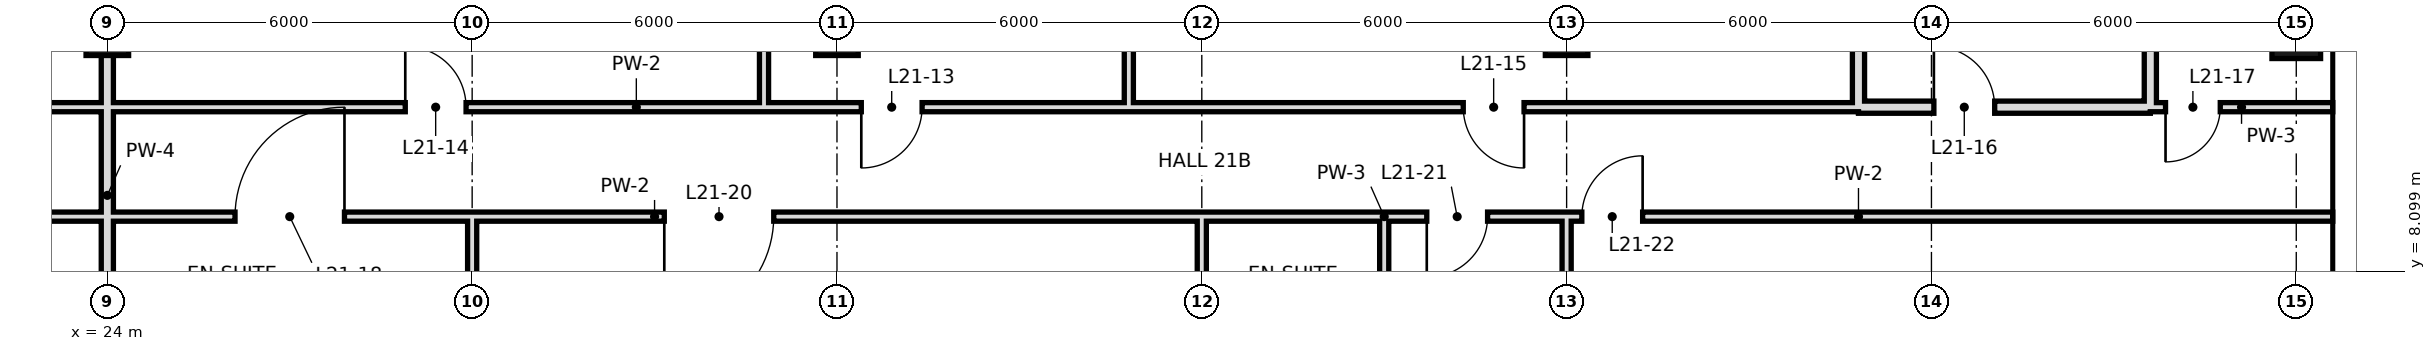
"""IFC4 building model, lengths in metres.
Left out: names, types, materials, properties, quantities, classifications, styles, units other than length and angle.
Written with IfcOpenShell. Run it as: python <this file> out.ifc"""

import sys

from ifc_helpers import new_model, si_unit, direction, frame, frame_2d, origin, origin_2d, place, context, subcontext, project, spatial, rectangle, hollow_rectangle, extrude, element, fill, save


model = new_model("IFC4")
c1 = context("Model", 3, precision=1e-05, world=origin(), true_north=direction((0.0, 1.0)))
c2 = subcontext(c1, "Body", "Model", "MODEL_VIEW")
j1 = project(units=[si_unit("LENGTHUNIT", "METRE"), si_unit("PLANEANGLEUNIT", "RADIAN")], contexts=[c1])
p1 = place(None, origin())
s1 = spatial("IfcSite", under=j1, at=p1, CompositionType="ELEMENT")
p2 = place(p1, origin())
s2 = spatial("IfcBuilding", under=s1, at=p2, CompositionType="ELEMENT")
p3 = place(p2, frame((0.0, 0.0, 99.8)))
s3 = spatial("IfcBuildingStorey", under=s2, at=p3, CompositionType="ELEMENT", Elevation=99.8)
for number, where, z_axis, x_axis in (
    (1, (24.0, 12.0, 0.0), (0.0, 0.0, 1.0), (1.0, 0.0, 0.0)),
    (2, (36.0, 12.0, 0.0), (0.0, 0.0, 1.0), (1.0, 0.0, 0.0)),
    (3, (48.0, 12.0, 0.0), (0.0, 0.0, 1.0), (1.0, 0.0, 0.0)),
):
    element("IfcColumn", number, at=place(p3, frame(where, z_axis=z_axis, x_axis=x_axis)), inside=s3, PredefinedType="COLUMN", context=c2, shape_type="SweptSolid", body=[
        extrude(hollow_rectangle(XDim=0.7, YDim=0.7, WallThickness=0.036, at=origin_2d()), origin(), (0.0, 0.0, 1.0), 3.6),
    ])
p4 = place(p3, frame((60.0, 12.0, 0.0), z_axis=(0.0, 0.0, 1.0), x_axis=(1.0, 0.0, 0.0)))
e4 = element("IfcColumn", 4, at=p4, inside=s3, PredefinedType="COLUMN", context=c2, shape_type="SweptSolid", body=[
    extrude(hollow_rectangle(XDim=0.8, YDim=0.8, WallThickness=0.04, at=origin_2d()), origin(), (0.0, 0.0, 1.0), 3.6),
])
p5 = place(p3, frame((24.0, 0.0, 0.0), z_axis=(0.0, 0.0, 1.0), x_axis=(0.0, 1.0, 0.0)))
e5 = element("IfcWall", 5, at=p5, inside=s3, PredefinedType="SOLIDWALL", context=c2, shape_type="SweptSolid", body=[
    extrude(rectangle(XDim=18.7, YDim=0.2, at=frame_2d((9.35, 0.0))), origin(), (0.0, 0.0, 1.0), 2.72),
])
p6 = place(p3, frame((30.0, -0.6, 0.0), z_axis=(0.0, 0.0, 1.0), x_axis=(0.0, 1.0, 0.0)))
e6 = element("IfcWall", 6, at=p6, inside=s3, PredefinedType="PARTITIONING", context=c2, shape_type="SweptSolid", body=[
    extrude(rectangle(XDim=9.6, YDim=0.15, at=frame_2d((4.8, 0.0))), origin(), (0.0, 0.0, 1.0), 3.42),
])
p7 = place(p6, frame((4.55, 0.0, 0.0)))
e7 = element("IfcOpeningElement", 7, at=p7, cuts=e6, PredefinedType="OPENING", context=c2, shape_type="SweptSolid", body=[
    extrude(rectangle(XDim=1.8, YDim=2.4, at=frame_2d((0.9, 1.2))), frame((0.0, 0.085, 0.0), z_axis=(0.0, -1.0, 0.0), x_axis=(1.0, 0.0, 0.0)), (0.0, 0.0, 1.0), 0.17),
])
for number, where, z_axis, x_axis in (
    (8, (34.8, 10.8, 0.0), (0.0, 0.0, 1.0), (0.0, 1.0, 0.0)),
    (9, (40.8, 10.8, 0.0), (0.0, 0.0, 1.0), (0.0, 1.0, 0.0)),
):
    element("IfcWall", number, at=place(p3, frame(where, z_axis=z_axis, x_axis=x_axis)), inside=s3, PredefinedType="PARTITIONING", context=c2, shape_type="SweptSolid", body=[
        extrude(rectangle(XDim=7.9, YDim=0.15, at=frame_2d((3.95, 0.0))), origin(), (0.0, 0.0, 1.0), 3.42),
    ])
for number, where, z_axis, x_axis in (
    (10, (42.0, 6.0, 0.0), (0.0, 0.0, 1.0), (0.0, 1.0, 0.0)),
    (11, (45.0, 6.0, 0.0), (0.0, 0.0, 1.0), (0.0, 1.0, 0.0)),
):
    element("IfcWall", number, at=place(p3, frame(where, z_axis=z_axis, x_axis=x_axis)), inside=s3, PredefinedType="PARTITIONING", context=c2, shape_type="SweptSolid", body=[
        extrude(rectangle(XDim=3.0, YDim=0.15, at=frame_2d((1.5, 0.0))), origin(), (0.0, 0.0, 1.0), 3.42),
    ])
p8 = place(p3, frame((48.0, 0.0, 0.0), z_axis=(0.0, 0.0, 1.0), x_axis=(0.0, 1.0, 0.0)))
e12 = element("IfcWall", 12, at=p8, inside=s3, PredefinedType="PARTITIONING", context=c2, shape_type="SweptSolid", body=[
    extrude(rectangle(XDim=9.0, YDim=0.15, at=frame_2d((4.5, 0.0))), origin(), (0.0, 0.0, 1.0), 2.72),
])
for number, where, z_axis, x_axis in (
    (13, (52.8, 10.8, 0.0), (0.0, 0.0, 1.0), (0.0, 1.0, 0.0)),
    (14, (57.6, 10.8, 0.0), (0.0, 0.0, 1.0), (0.0, 1.0, 0.0)),
):
    element("IfcWall", number, at=place(p3, frame(where, z_axis=z_axis, x_axis=x_axis)), inside=s3, PredefinedType="SOLIDWALL", context=c2, shape_type="SweptSolid", body=[
        extrude(rectangle(XDim=7.2, YDim=0.2, at=frame_2d((3.6, 0.0))), origin(), (0.0, 0.0, 1.0), 2.72),
    ])
p9 = place(p3, frame((52.8, 10.8, 0.0), z_axis=(0.0, 0.0, 1.0), x_axis=(1.0, 0.0, 0.0)))
e15 = element("IfcWall", 15, at=p9, inside=s3, PredefinedType="SOLIDWALL", context=c2, shape_type="SweptSolid", body=[
    extrude(rectangle(XDim=4.8, YDim=0.2, at=frame_2d((2.4, 0.0))), origin(), (0.0, 0.0, 1.0), 3.42),
])
p10 = place(p9, frame((1.24, 0.0, 0.0)))
e16 = element("IfcOpeningElement", 16, at=p10, cuts=e15, PredefinedType="OPENING", context=c2, shape_type="SweptSolid", body=[
    extrude(rectangle(XDim=1.0, YDim=2.4, at=frame_2d((0.5, 1.2))), frame((0.0, 0.11, 0.0), z_axis=(0.0, -1.0, 0.0), x_axis=(1.0, 0.0, 0.0)), (0.0, 0.0, 1.0), 0.22),
])
p11 = place(p3, frame((12.6, 10.8, 0.0), z_axis=(0.0, 0.0, 1.0), x_axis=(1.0, 0.0, 0.0)))
e17 = element("IfcWall", 17, at=p11, inside=s3, PredefinedType="PARTITIONING", context=c2, shape_type="SweptSolid", body=[
    extrude(rectangle(XDim=40.2, YDim=0.15, at=frame_2d((20.1, 0.0))), origin(), (0.0, 0.0, 1.0), 3.42),
])
p12 = place(p11, frame((8.5, 0.0, 0.0)))
e18 = element("IfcOpeningElement", 18, at=p12, cuts=e17, PredefinedType="OPENING", context=c2, shape_type="SweptSolid", body=[
    extrude(rectangle(XDim=1.0, YDim=2.4, at=frame_2d((0.5, 1.2))), frame((0.0, 0.085, 0.0), z_axis=(0.0, -1.0, 0.0), x_axis=(1.0, 0.0, 0.0)), (0.0, 0.0, 1.0), 0.17),
])
p13 = place(p11, frame((1.78, 0.0, 0.0)))
e19 = element("IfcOpeningElement", 19, at=p13, cuts=e17, PredefinedType="OPENING", context=c2, shape_type="SweptSolid", body=[
    extrude(rectangle(XDim=1.0, YDim=2.4, at=frame_2d((0.5, 1.2))), frame((0.0, 0.085, 0.0), z_axis=(0.0, -1.0, 0.0), x_axis=(1.0, 0.0, 0.0)), (0.0, 0.0, 1.0), 0.17),
])
p14 = place(p11, frame((23.8, 0.0, 0.0)))
e20 = element("IfcOpeningElement", 20, at=p14, cuts=e17, PredefinedType="OPENING", context=c2, shape_type="SweptSolid", body=[
    extrude(rectangle(XDim=1.0, YDim=2.4, at=frame_2d((0.5, 1.2))), frame((0.0, 0.085, 0.0), z_axis=(0.0, -1.0, 0.0), x_axis=(1.0, 0.0, 0.0)), (0.0, 0.0, 1.0), 0.17),
])
p15 = place(p11, frame((16.3, 0.0, 0.0)))
e21 = element("IfcOpeningElement", 21, at=p15, cuts=e17, PredefinedType="OPENING", context=c2, shape_type="SweptSolid", body=[
    extrude(rectangle(XDim=1.0, YDim=2.4, at=frame_2d((0.5, 1.2))), frame((0.0, 0.085, 0.0), z_axis=(0.0, -1.0, 0.0), x_axis=(1.0, 0.0, 0.0)), (0.0, 0.0, 1.0), 0.17),
])
p16 = place(p11, frame((33.7, 0.0, 0.0)))
e22 = element("IfcOpeningElement", 22, at=p16, cuts=e17, PredefinedType="OPENING", context=c2, shape_type="SweptSolid", body=[
    extrude(rectangle(XDim=1.0, YDim=2.4, at=frame_2d((0.5, 1.2))), frame((0.0, 0.085, 0.0), z_axis=(0.0, -1.0, 0.0), x_axis=(1.0, 0.0, 0.0)), (0.0, 0.0, 1.0), 0.17),
])
p17 = place(p3, frame((57.6, 10.8, 0.0), z_axis=(0.0, 0.0, 1.0), x_axis=(1.0, 0.0, 0.0)))
e23 = element("IfcWall", 23, at=p17, inside=s3, PredefinedType="PARTITIONING", context=c2, shape_type="SweptSolid", body=[
    extrude(rectangle(XDim=3.0, YDim=0.15, at=frame_2d((1.5, 0.0))), origin(), (0.0, 0.0, 1.0), 3.42),
])
p18 = place(p17, frame((0.25, 0.0, 0.0)))
e24 = element("IfcOpeningElement", 24, at=p18, cuts=e23, PredefinedType="OPENING", context=c2, shape_type="SweptSolid", body=[
    extrude(rectangle(XDim=0.9, YDim=2.4, at=frame_2d((0.45, 1.2))), frame((0.0, 0.085, 0.0), z_axis=(0.0, -1.0, 0.0), x_axis=(1.0, 0.0, 0.0)), (0.0, 0.0, 1.0), 0.17),
])
p19 = place(p3, frame((24.0, 9.0, 0.0), z_axis=(0.0, 0.0, 1.0), x_axis=(1.0, 0.0, 0.0)))
e25 = element("IfcWall", 25, at=p19, inside=s3, PredefinedType="PARTITIONING", context=c2, shape_type="SweptSolid", body=[
    extrude(rectangle(XDim=18.0, YDim=0.15, at=frame_2d((9.0, 0.0))), origin(), (0.0, 0.0, 1.0), 3.42),
])
p20 = place(p19, frame((2.1, 0.0, 0.0)))
e26 = element("IfcOpeningElement", 26, at=p20, cuts=e25, PredefinedType="OPENING", context=c2, shape_type="SweptSolid", body=[
    extrude(rectangle(XDim=1.8, YDim=2.4, at=frame_2d((0.9, 1.2))), frame((0.0, 0.085, 0.0), z_axis=(0.0, -1.0, 0.0), x_axis=(1.0, 0.0, 0.0)), (0.0, 0.0, 1.0), 0.17),
])
p21 = place(p19, frame((9.16, 0.0, 0.0)))
e27 = element("IfcOpeningElement", 27, at=p21, cuts=e25, PredefinedType="OPENING", context=c2, shape_type="SweptSolid", body=[
    extrude(rectangle(XDim=1.8, YDim=2.4, at=frame_2d((0.9, 1.2))), frame((0.0, 0.085, 0.0), z_axis=(0.0, -1.0, 0.0), x_axis=(1.0, 0.0, 0.0)), (0.0, 0.0, 1.0), 0.17),
])
p22 = place(p3, frame((45.0, 9.0, 0.0), z_axis=(0.0, 0.0, 1.0), x_axis=(1.0, 0.0, 0.0)))
e28 = element("IfcWall", 28, at=p22, inside=s3, PredefinedType="PARTITIONING", context=c2, shape_type="SweptSolid", body=[
    extrude(rectangle(XDim=15.6, YDim=0.15, at=frame_2d((7.8, 0.0))), origin(), (0.0, 0.0, 1.0), 3.42),
])
p23 = place(p22, frame((0.7, 0.0, 0.0)))
e29 = element("IfcOpeningElement", 29, at=p23, cuts=e28, PredefinedType="OPENING", context=c2, shape_type="SweptSolid", body=[
    extrude(rectangle(XDim=1.0, YDim=2.4, at=frame_2d((0.5, 1.2))), frame((0.0, 0.085, 0.0), z_axis=(0.0, -1.0, 0.0), x_axis=(1.0, 0.0, 0.0)), (0.0, 0.0, 1.0), 0.17),
])
p24 = place(p22, frame((3.25, 0.0, 0.0)))
e30 = element("IfcOpeningElement", 30, at=p24, cuts=e28, PredefinedType="OPENING", context=c2, shape_type="SweptSolid", body=[
    extrude(rectangle(XDim=1.0, YDim=2.4, at=frame_2d((0.5, 1.2))), frame((0.0, 0.085, 0.0), z_axis=(0.0, -1.0, 0.0), x_axis=(1.0, 0.0, 0.0)), (0.0, 0.0, 1.0), 0.17),
])
p25 = place(p3, frame((21.6, 9.0, 0.0), z_axis=(0.0, 0.0, 1.0), x_axis=(1.0, 0.0, 0.0)))
e31 = element("IfcWall", 31, at=p25, inside=s3, PredefinedType="PARTITIONING", context=c2, shape_type="SweptSolid", body=[
    extrude(rectangle(XDim=2.4, YDim=0.15, at=frame_2d((1.2, 0.0))), origin(), (0.0, 0.0, 1.0), 3.42),
])
p26 = place(p3, frame((42.0, 9.0, 0.0), z_axis=(0.0, 0.0, 1.0), x_axis=(1.0, 0.0, 0.0)))
e32 = element("IfcWall", 32, at=p26, inside=s3, PredefinedType="PARTITIONING", context=c2, shape_type="SweptSolid", body=[
    extrude(rectangle(XDim=3.0, YDim=0.15, at=frame_2d((1.5, 0.0))), origin(), (0.0, 0.0, 1.0), 3.42),
])
p27 = place(p14, frame((1.0, 0.0, 0.0), z_axis=(0.0, 0.0, 1.0), x_axis=(-1.0, 0.0, 0.0)))
e33 = element("IfcDoor", 33, at=p27, inside=s3, OperationType="SINGLE_SWING_RIGHT", PredefinedType="DOOR", context=c2, shape_type="SweptSolid", body=[
    extrude(rectangle(XDim=1.0, YDim=2.4, at=frame_2d((0.5, 1.2))), frame((0.0, 0.025, 0.0), z_axis=(0.0, -1.0, 0.0), x_axis=(1.0, 0.0, 0.0)), (0.0, 0.0, 1.0), 0.05),
])
fill(e20, e33)
p28 = place(p15, origin())
e34 = element("IfcDoor", 34, at=p28, inside=s3, OperationType="SINGLE_SWING_LEFT", PredefinedType="DOOR", context=c2, shape_type="SweptSolid", body=[
    extrude(rectangle(XDim=1.0, YDim=2.4, at=frame_2d((0.5, 1.2))), frame((0.0, 0.025, 0.0), z_axis=(0.0, -1.0, 0.0), x_axis=(1.0, 0.0, 0.0)), (0.0, 0.0, 1.0), 0.05),
])
fill(e21, e34)
p29 = place(p16, origin())
e35 = element("IfcDoor", 35, at=p29, inside=s3, OperationType="SINGLE_SWING_RIGHT", PredefinedType="DOOR", context=c2, shape_type="SweptSolid", body=[
    extrude(rectangle(XDim=1.0, YDim=2.4, at=frame_2d((0.5, 1.2))), frame((0.0, 0.025, 0.0), z_axis=(0.0, -1.0, 0.0), x_axis=(1.0, 0.0, 0.0)), (0.0, 0.0, 1.0), 0.05),
])
fill(e22, e35)
p30 = place(p10, origin())
e36 = element("IfcDoor", 36, at=p30, inside=s3, OperationType="SINGLE_SWING_LEFT", PredefinedType="DOOR", context=c2, shape_type="SweptSolid", body=[
    extrude(rectangle(XDim=1.0, YDim=2.4, at=frame_2d((0.5, 1.2))), frame((0.0, 0.025, 0.0), z_axis=(0.0, -1.0, 0.0), x_axis=(1.0, 0.0, 0.0)), (0.0, 0.0, 1.0), 0.05),
])
fill(e16, e36)
p31 = place(p18, frame((0.9, 0.0, 0.0), z_axis=(0.0, 0.0, 1.0), x_axis=(-1.0, 0.0, 0.0)))
e37 = element("IfcDoor", 37, at=p31, inside=s3, OperationType="SINGLE_SWING_RIGHT", PredefinedType="DOOR", context=c2, shape_type="SweptSolid", body=[
    extrude(rectangle(XDim=0.9, YDim=2.4, at=frame_2d((0.45, 1.2))), frame((0.0, 0.025, 0.0), z_axis=(0.0, -1.0, 0.0), x_axis=(1.0, 0.0, 0.0)), (0.0, 0.0, 1.0), 0.05),
])
fill(e24, e37)
p32 = place(p20, frame((1.8, 0.0, 0.0), z_axis=(0.0, 0.0, 1.0), x_axis=(-1.0, 0.0, 0.0)))
e38 = element("IfcDoor", 38, at=p32, inside=s3, OperationType="SINGLE_SWING_LEFT", PredefinedType="DOOR", context=c2, shape_type="SweptSolid", body=[
    extrude(rectangle(XDim=1.8, YDim=2.4, at=frame_2d((0.9, 1.2))), frame((0.0, 0.025, 0.0), z_axis=(0.0, -1.0, 0.0), x_axis=(1.0, 0.0, 0.0)), (0.0, 0.0, 1.0), 0.05),
])
fill(e26, e38)
p33 = place(p21, frame((1.8, 0.0, 0.0), z_axis=(0.0, 0.0, 1.0), x_axis=(-1.0, 0.0, 0.0)))
e39 = element("IfcDoor", 39, at=p33, inside=s3, OperationType="SINGLE_SWING_RIGHT", PredefinedType="DOOR", context=c2, shape_type="SweptSolid", body=[
    extrude(rectangle(XDim=1.8, YDim=2.4, at=frame_2d((0.9, 1.2))), frame((0.0, 0.025, 0.0), z_axis=(0.0, -1.0, 0.0), x_axis=(1.0, 0.0, 0.0)), (0.0, 0.0, 1.0), 0.05),
])
fill(e27, e39)
p34 = place(p23, frame((1.0, 0.0, 0.0), z_axis=(0.0, 0.0, 1.0), x_axis=(-1.0, 0.0, 0.0)))
e40 = element("IfcDoor", 40, at=p34, inside=s3, OperationType="SINGLE_SWING_RIGHT", PredefinedType="DOOR", context=c2, shape_type="SweptSolid", body=[
    extrude(rectangle(XDim=1.0, YDim=2.4, at=frame_2d((0.5, 1.2))), frame((0.0, 0.025, 0.0), z_axis=(0.0, -1.0, 0.0), x_axis=(1.0, 0.0, 0.0)), (0.0, 0.0, 1.0), 0.05),
])
fill(e29, e40)
p35 = place(p24, frame((1.0, 0.0, 0.0), z_axis=(0.0, 0.0, 1.0), x_axis=(-1.0, 0.0, 0.0)))
e41 = element("IfcDoor", 41, at=p35, inside=s3, OperationType="SINGLE_SWING_LEFT", PredefinedType="DOOR", context=c2, shape_type="SweptSolid", body=[
    extrude(rectangle(XDim=1.0, YDim=2.4, at=frame_2d((0.5, 1.2))), frame((0.0, 0.025, 0.0), z_axis=(0.0, -1.0, 0.0), x_axis=(1.0, 0.0, 0.0)), (0.0, 0.0, 1.0), 0.05),
])
fill(e30, e41)
save(model, sys.argv[1])
